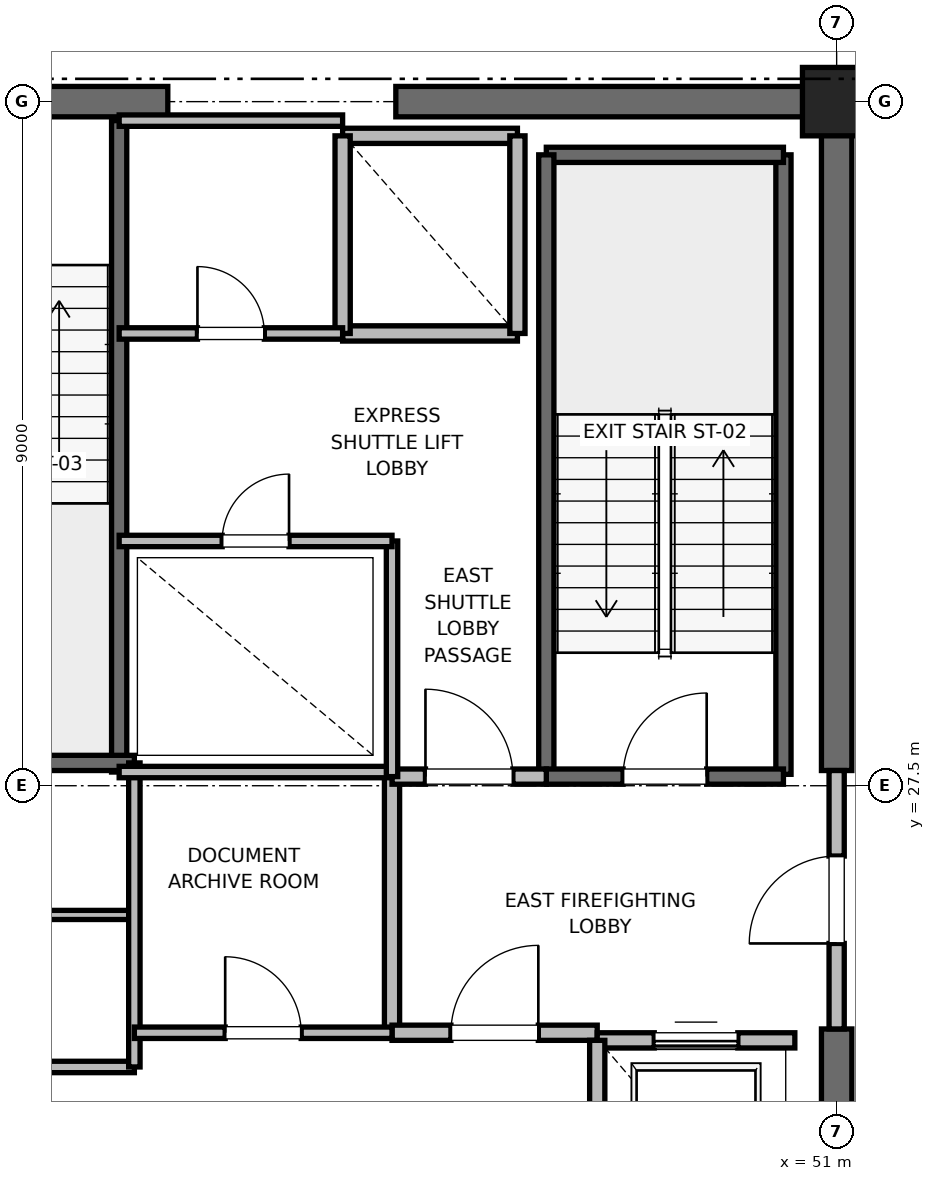
"""IFC4 building model, lengths in metres.
Left out: names, types, materials, properties, quantities, classifications, styles, units other than length and angle.
Written with IfcOpenShell. Run it as: python <this file> out.ifc"""

import sys

from ifc_helpers import new_model, si_unit, direction, frame, frame_2d, origin, origin_2d, place, context, subcontext, project, spatial, rectangle, extrude, element, fill, save


model = new_model("IFC4")
c1 = context("Model", 3, precision=1e-05, world=origin(), true_north=direction((0.0, 1.0)))
c2 = subcontext(c1, "Body", "Model", "MODEL_VIEW")
j1 = project(units=[si_unit("LENGTHUNIT", "METRE"), si_unit("PLANEANGLEUNIT", "RADIAN")], contexts=[c1])
p1 = place(None, origin())
s1 = spatial("IfcSite", under=j1, at=p1, CompositionType="ELEMENT")
p2 = place(p1, origin())
s2 = spatial("IfcBuilding", under=s1, at=p2, CompositionType="ELEMENT")
p3 = place(p2, frame((0.0, 0.0, 310.8)))
s3 = spatial("IfcBuildingStorey", under=s2, at=p3, CompositionType="ELEMENT", Elevation=310.8)
p4 = place(p3, frame((51.0, 36.5, 0.0), z_axis=(0.0, 0.0, 1.0), x_axis=(1.0, 0.0, 0.0)))
e1 = element("IfcColumn", 1, at=p4, inside=s3, PredefinedType="PILASTER", context=c2, shape_type="SweptSolid", body=[
    extrude(rectangle(XDim=0.9, YDim=0.9, at=origin_2d()), origin(), (0.0, 0.0, 1.0), 4.0),
])
p5 = place(p3, frame((37.8, 36.5, 0.0), z_axis=(0.0, 0.0, 1.0), x_axis=(1.0, 0.0, 0.0)))
e2 = element("IfcWall", 2, at=p5, inside=s3, PredefinedType="SHEAR", context=c2, shape_type="SweptSolid", body=[
    extrude(rectangle(XDim=4.4, YDim=0.4, at=frame_2d((2.2, 0.0))), origin(), (0.0, 0.0, 1.0), 3.785),
])
p6 = place(p5, frame((1.65, 0.0, 0.0)))
e3 = element("IfcOpeningElement", 3, at=p6, cuts=e2, PredefinedType="OPENING", context=c2, shape_type="SweptSolid", body=[
    extrude(rectangle(XDim=1.1, YDim=2.15, at=frame_2d((0.55, 1.075))), frame((0.0, 0.2, 0.0), z_axis=(0.0, -1.0, 0.0), x_axis=(1.0, 0.0, 0.0)), (0.0, 0.0, 1.0), 0.4),
])
for number, where, z_axis, x_axis in (
    (4, (45.2, 36.5, 0.0), (0.0, 0.0, 1.0), (1.0, 0.0, 0.0)),
    (5, (51.0, 18.5, 0.0), (0.0, 0.0, 1.0), (0.0, 1.0, 0.0)),
):
    element("IfcWall", number, at=place(p3, frame(where, z_axis=z_axis, x_axis=x_axis)), inside=s3, PredefinedType="SHEAR", context=c2, shape_type="SweptSolid", body=[
        extrude(rectangle(XDim=5.8, YDim=0.4, at=frame_2d((2.9, 0.0))), origin(), (0.0, 0.0, 1.0), 3.785),
    ])
p7 = place(p3, frame((51.0, 27.7, 0.0), z_axis=(0.0, 0.0, 1.0), x_axis=(0.0, 1.0, 0.0)))
e6 = element("IfcWall", 6, at=p7, inside=s3, PredefinedType="SHEAR", context=c2, shape_type="SweptSolid", body=[
    extrude(rectangle(XDim=8.8, YDim=0.4, at=frame_2d((4.4, 0.0))), origin(), (0.0, 0.0, 1.0), 3.785),
])
p8 = place(p3, frame((50.3, 27.65, 0.0), z_axis=(0.0, 0.0, 1.0), x_axis=(0.0, 1.0, 0.0)))
e7 = element("IfcWall", 7, at=p8, inside=s3, PredefinedType="SOLIDWALL", context=c2, shape_type="SweptSolid", body=[
    extrude(rectangle(XDim=8.15, YDim=0.2, at=frame_2d((4.075, 0.0))), origin(), (0.0, 0.0, 1.0), 3.785),
])
p9 = place(p3, frame((47.18, 35.8, 0.0), z_axis=(0.0, 0.0, 1.0), x_axis=(1.0, 0.0, 0.0)))
e8 = element("IfcWall", 8, at=p9, inside=s3, PredefinedType="SOLIDWALL", context=c2, shape_type="SweptSolid", body=[
    extrude(rectangle(XDim=3.12, YDim=0.2, at=frame_2d((1.56, 0.0))), origin(), (0.0, 0.0, 1.0), 3.785),
])
p10 = place(p3, frame((47.18, 27.62, 0.0), z_axis=(0.0, 0.0, 1.0), x_axis=(0.0, 1.0, 0.0)))
e9 = element("IfcWall", 9, at=p10, inside=s3, PredefinedType="SOLIDWALL", context=c2, shape_type="SweptSolid", body=[
    extrude(rectangle(XDim=8.18, YDim=0.2, at=frame_2d((4.09, 0.0))), origin(), (0.0, 0.0, 1.0), 3.785),
])
p11 = place(p3, frame((47.18, 27.62, 0.0), z_axis=(0.0, 0.0, 1.0), x_axis=(1.0, 0.0, 0.0)))
e10 = element("IfcWall", 10, at=p11, inside=s3, PredefinedType="SOLIDWALL", context=c2, shape_type="SweptSolid", body=[
    extrude(rectangle(XDim=3.12, YDim=0.2, at=frame_2d((1.56, 0.0))), origin(), (0.0, 0.0, 1.0), 3.785),
])
p12 = place(p11, frame((1.01, 0.0, 0.0)))
e11 = element("IfcOpeningElement", 11, at=p12, cuts=e10, PredefinedType="OPENING", context=c2, shape_type="SweptSolid", body=[
    extrude(rectangle(XDim=1.1, YDim=2.15, at=frame_2d((0.55, 1.075))), frame((0.0, 0.1, 0.0), z_axis=(0.0, -1.0, 0.0), x_axis=(1.0, 0.0, 0.0)), (0.0, 0.0, 1.0), 0.2),
])
p13 = place(p3, frame((41.56, 27.68, 0.0), z_axis=(0.0, 0.0, 1.0), x_axis=(0.0, 1.0, 0.0)))
e12 = element("IfcWall", 12, at=p13, inside=s3, PredefinedType="SOLIDWALL", context=c2, shape_type="SweptSolid", body=[
    extrude(rectangle(XDim=8.57, YDim=0.2, at=frame_2d((4.285, 0.0))), origin(), (0.0, 0.0, 1.0), 3.785),
])
p14 = place(p3, frame((38.44, 27.8, 0.0), z_axis=(0.0, 0.0, 1.0), x_axis=(1.0, 0.0, 0.0)))
e13 = element("IfcWall", 13, at=p14, inside=s3, PredefinedType="SOLIDWALL", context=c2, shape_type="SweptSolid", body=[
    extrude(rectangle(XDim=3.32, YDim=0.2, at=frame_2d((1.66, 0.0))), origin(), (0.0, 0.0, 1.0), 3.785),
])
p15 = place(p3, frame((45.15, 24.25, 0.0), z_axis=(0.0, 0.0, 1.0), x_axis=(0.0, 1.0, 0.0)))
e14 = element("IfcWall", 14, at=p15, inside=s3, PredefinedType="PARTITIONING", context=c2, shape_type="SweptSolid", body=[
    extrude(rectangle(XDim=3.37, YDim=0.2, at=frame_2d((1.685, 0.0))), origin(), (0.0, 0.0, 1.0), 3.785),
])
p16 = place(p3, frame((45.15, 24.25, 0.0), z_axis=(0.0, 0.0, 1.0), x_axis=(1.0, 0.0, 0.0)))
e15 = element("IfcWall", 15, at=p16, inside=s3, PredefinedType="PARTITIONING", context=c2, shape_type="SweptSolid", body=[
    extrude(rectangle(XDim=2.7, YDim=0.2, at=frame_2d((1.35, 0.0))), origin(), (0.0, 0.0, 1.0), 3.785),
])
p17 = place(p16, frame((0.775, 0.0, 0.0)))
e16 = element("IfcOpeningElement", 16, at=p17, cuts=e15, PredefinedType="OPENING", context=c2, shape_type="SweptSolid", body=[
    extrude(rectangle(XDim=1.15, YDim=2.2, at=frame_2d((0.575, 1.1))), frame((0.0, 0.1, 0.0), z_axis=(0.0, -1.0, 0.0), x_axis=(1.0, 0.0, 0.0)), (0.0, 0.0, 1.0), 0.2),
])
p18 = place(p3, frame((45.15, 27.62, 0.0), z_axis=(0.0, 0.0, 1.0), x_axis=(1.0, 0.0, 0.0)))
e17 = element("IfcWall", 17, at=p18, inside=s3, PredefinedType="PARTITIONING", context=c2, shape_type="SweptSolid", body=[
    extrude(rectangle(XDim=2.03, YDim=0.2, at=frame_2d((1.015, 0.0))), origin(), (0.0, 0.0, 1.0), 3.785),
])
p19 = place(p18, frame((0.44, 0.0, 0.0)))
e18 = element("IfcOpeningElement", 18, at=p19, cuts=e17, PredefinedType="OPENING", context=c2, shape_type="SweptSolid", body=[
    extrude(rectangle(XDim=1.15, YDim=2.2, at=frame_2d((0.575, 1.1))), frame((0.0, 0.1, 0.0), z_axis=(0.0, -1.0, 0.0), x_axis=(1.0, 0.0, 0.0)), (0.0, 0.0, 1.0), 0.2),
])
p20 = place(p3, frame((51.0, 24.3, 0.0), z_axis=(0.0, 0.0, 1.0), x_axis=(0.0, 1.0, 0.0)))
e19 = element("IfcWall", 19, at=p20, inside=s3, PredefinedType="PARTITIONING", context=c2, shape_type="SweptSolid", body=[
    extrude(rectangle(XDim=3.4, YDim=0.2, at=frame_2d((1.7, 0.0))), origin(), (0.0, 0.0, 1.0), 2.865),
])
p21 = place(p20, frame((1.125, 0.0, 0.0)))
e20 = element("IfcOpeningElement", 20, at=p21, cuts=e19, PredefinedType="OPENING", context=c2, shape_type="SweptSolid", body=[
    extrude(rectangle(XDim=1.15, YDim=2.2, at=frame_2d((0.575, 1.1))), frame((0.0, 0.1, 0.0), z_axis=(0.0, -1.0, 0.0), x_axis=(1.0, 0.0, 0.0)), (0.0, 0.0, 1.0), 0.2),
])
p22 = place(p3, frame((50.45, 24.15, 0.0), z_axis=(0.0, 0.0, 1.0), x_axis=(-1.0, 0.0, 0.0)))
e21 = element("IfcWall", 21, at=p22, inside=s3, PredefinedType="SOLIDWALL", context=c2, shape_type="SweptSolid", body=[
    extrude(rectangle(XDim=2.6, YDim=0.2, at=frame_2d((1.3, 0.0))), origin(), (0.0, 0.0, 1.0), 2.865),
])
p23 = place(p22, frame((0.75, 0.0, 0.0)))
e22 = element("IfcOpeningElement", 22, at=p23, cuts=e21, PredefinedType="OPENING", context=c2, shape_type="SweptSolid", body=[
    extrude(rectangle(XDim=1.1, YDim=2.2, at=frame_2d((0.55, 1.1))), frame((0.0, 0.1, 0.0), z_axis=(0.0, -1.0, 0.0), x_axis=(1.0, 0.0, 0.0)), (0.0, 0.0, 1.0), 0.2),
])
p24 = place(p3, frame((47.85, 24.15, 0.0), z_axis=(0.0, 0.0, 1.0), x_axis=(0.0, -1.0, 0.0)))
e23 = element("IfcWall", 23, at=p24, inside=s3, PredefinedType="SOLIDWALL", context=c2, shape_type="SweptSolid", body=[
    extrude(rectangle(XDim=3.0, YDim=0.2, at=frame_2d((1.5, 0.0))), origin(), (0.0, 0.0, 1.0), 3.785),
])
p25 = place(p3, frame((44.5, 33.45, 0.0), z_axis=(0.0, 0.0, 1.0), x_axis=(1.0, 0.0, 0.0)))
e24 = element("IfcWall", 24, at=p25, inside=s3, PredefinedType="SOLIDWALL", context=c2, shape_type="SweptSolid", body=[
    extrude(rectangle(XDim=2.3, YDim=0.2, at=frame_2d((1.15, 0.0))), origin(), (0.0, 0.0, 1.0), 3.785),
])
p26 = place(p3, frame((46.8, 36.05, 0.0), z_axis=(0.0, 0.0, 1.0), x_axis=(-1.0, 0.0, 0.0)))
e25 = element("IfcWall", 25, at=p26, inside=s3, PredefinedType="SOLIDWALL", context=c2, shape_type="SweptSolid", body=[
    extrude(rectangle(XDim=2.3, YDim=0.2, at=frame_2d((1.15, 0.0))), origin(), (0.0, 0.0, 1.0), 2.865),
])
p27 = place(p3, frame((44.5, 36.05, 0.0), z_axis=(0.0, 0.0, 1.0), x_axis=(0.0, -1.0, 0.0)))
e26 = element("IfcWall", 26, at=p27, inside=s3, PredefinedType="SOLIDWALL", context=c2, shape_type="SweptSolid", body=[
    extrude(rectangle(XDim=2.6, YDim=0.2, at=frame_2d((1.3, 0.0))), origin(), (0.0, 0.0, 1.0), 2.865),
])
p28 = place(p3, frame((46.8, 33.45, 0.0), z_axis=(0.0, 0.0, 1.0), x_axis=(0.0, 1.0, 0.0)))
e27 = element("IfcWall", 27, at=p28, inside=s3, PredefinedType="SOLIDWALL", context=c2, shape_type="SweptSolid", body=[
    extrude(rectangle(XDim=2.6, YDim=0.2, at=frame_2d((1.3, 0.0))), origin(), (0.0, 0.0, 1.0), 3.785),
])
p29 = place(p3, frame((39.95, 23.8, 0.0), z_axis=(0.0, 0.0, 1.0), x_axis=(1.0, 0.0, 0.0)))
e28 = element("IfcWall", 28, at=p29, inside=s3, PredefinedType="PARTITIONING", context=c2, shape_type="SweptSolid", body=[
    extrude(rectangle(XDim=1.81, YDim=0.15, at=frame_2d((0.905, 0.0))), origin(), (0.0, 0.0, 1.0), 2.85),
])
p30 = place(p3, frame((39.95, 25.8, 0.0), z_axis=(0.0, 0.0, 1.0), x_axis=(1.0, 0.0, 0.0)))
e29 = element("IfcWall", 29, at=p30, inside=s3, PredefinedType="PARTITIONING", context=c2, shape_type="SweptSolid", body=[
    extrude(rectangle(XDim=1.81, YDim=0.12, at=frame_2d((0.905, 0.0))), origin(), (0.0, 0.0, 1.0), 2.85),
])
p31 = place(p3, frame((41.76, 23.8, 0.0), z_axis=(0.0, 0.0, 1.0), x_axis=(0.0, 1.0, 0.0)))
e30 = element("IfcWall", 30, at=p31, inside=s3, PredefinedType="PARTITIONING", context=c2, shape_type="SweptSolid", body=[
    extrude(rectangle(XDim=4.0, YDim=0.15, at=frame_2d((2.0, 0.0))), origin(), (0.0, 0.0, 1.0), 2.85),
])
p32 = place(p3, frame((41.56, 27.68, 0.0), z_axis=(0.0, 0.0, 1.0), x_axis=(1.0, 0.0, 0.0)))
e31 = element("IfcWall", 31, at=p32, inside=s3, PredefinedType="PARTITIONING", context=c2, shape_type="SweptSolid", body=[
    extrude(rectangle(XDim=3.59, YDim=0.15, at=frame_2d((1.795, 0.0))), origin(), (0.0, 0.0, 1.0), 2.85),
])
p33 = place(p3, frame((41.76, 24.25, 0.0), z_axis=(0.0, 0.0, 1.0), x_axis=(1.0, 0.0, 0.0)))
e32 = element("IfcWall", 32, at=p33, inside=s3, PredefinedType="PARTITIONING", context=c2, shape_type="SweptSolid", body=[
    extrude(rectangle(XDim=3.39, YDim=0.15, at=frame_2d((1.695, 0.0))), origin(), (0.0, 0.0, 1.0), 2.85),
])
p34 = place(p33, frame((1.195, 0.0, 0.0)))
e33 = element("IfcOpeningElement", 33, at=p34, cuts=e32, PredefinedType="OPENING", context=c2, shape_type="SweptSolid", body=[
    extrude(rectangle(XDim=1.0, YDim=2.15, at=frame_2d((0.5, 1.075))), frame((0.0, 0.075, 0.0), z_axis=(0.0, -1.0, 0.0), x_axis=(1.0, 0.0, 0.0)), (0.0, 0.0, 1.0), 0.15),
])
p35 = place(p3, frame((45.15, 27.62, 0.0), z_axis=(0.0, 0.0, 1.0), x_axis=(0.0, 1.0, 0.0)))
e34 = element("IfcWall", 34, at=p35, inside=s3, PredefinedType="PARTITIONING", context=c2, shape_type="SweptSolid", body=[
    extrude(rectangle(XDim=3.1, YDim=0.15, at=frame_2d((1.55, 0.0))), origin(), (0.0, 0.0, 1.0), 2.85),
])
p36 = place(p3, frame((41.56, 30.72, 0.0), z_axis=(0.0, 0.0, 1.0), x_axis=(1.0, 0.0, 0.0)))
e35 = element("IfcWall", 35, at=p36, inside=s3, PredefinedType="PARTITIONING", context=c2, shape_type="SweptSolid", body=[
    extrude(rectangle(XDim=3.59, YDim=0.15, at=frame_2d((1.795, 0.0))), origin(), (0.0, 0.0, 1.0), 2.85),
])
p37 = place(p36, frame((1.355, 0.0, 0.0)))
e36 = element("IfcOpeningElement", 36, at=p37, cuts=e35, PredefinedType="OPENING", context=c2, shape_type="SweptSolid", body=[
    extrude(rectangle(XDim=0.88, YDim=2.1, at=frame_2d((0.44, 1.05))), frame((0.0, 0.075, 0.0), z_axis=(0.0, -1.0, 0.0), x_axis=(1.0, 0.0, 0.0)), (0.0, 0.0, 1.0), 0.15),
])
p38 = place(p3, frame((41.56, 36.25, 0.0), z_axis=(0.0, 0.0, 1.0), x_axis=(1.0, 0.0, 0.0)))
e37 = element("IfcWall", 37, at=p38, inside=s3, PredefinedType="PARTITIONING", context=c2, shape_type="SweptSolid", body=[
    extrude(rectangle(XDim=2.94, YDim=0.15, at=frame_2d((1.47, 0.0))), origin(), (0.0, 0.0, 1.0), 2.85),
])
p39 = place(p3, frame((41.56, 33.45, 0.0), z_axis=(0.0, 0.0, 1.0), x_axis=(1.0, 0.0, 0.0)))
e38 = element("IfcWall", 38, at=p39, inside=s3, PredefinedType="PARTITIONING", context=c2, shape_type="SweptSolid", body=[
    extrude(rectangle(XDim=2.94, YDim=0.15, at=frame_2d((1.47, 0.0))), origin(), (0.0, 0.0, 1.0), 2.85),
])
p40 = place(p39, frame((1.03, 0.0, 0.0)))
e39 = element("IfcOpeningElement", 39, at=p40, cuts=e38, PredefinedType="OPENING", context=c2, shape_type="SweptSolid", body=[
    extrude(rectangle(XDim=0.88, YDim=2.1, at=frame_2d((0.44, 1.05))), frame((0.0, 0.075, 0.0), z_axis=(0.0, -1.0, 0.0), x_axis=(1.0, 0.0, 0.0)), (0.0, 0.0, 1.0), 0.15),
])
p41 = place(p12, origin())
e40 = element("IfcDoor", 40, at=p41, inside=s3, OperationType="SINGLE_SWING_RIGHT", PredefinedType="DOOR", context=c2, shape_type="SweptSolid", body=[
    extrude(rectangle(XDim=1.1, YDim=2.15, at=frame_2d((0.55, 1.075))), frame((0.0, 0.025, 0.0), z_axis=(0.0, -1.0, 0.0), x_axis=(1.0, 0.0, 0.0)), (0.0, 0.0, 1.0), 0.05),
])
fill(e11, e40)
p42 = place(p17, origin())
e41 = element("IfcDoor", 41, at=p42, inside=s3, OperationType="SINGLE_SWING_RIGHT", PredefinedType="DOOR", context=c2, shape_type="SweptSolid", body=[
    extrude(rectangle(XDim=1.15, YDim=2.2, at=frame_2d((0.575, 1.1))), frame((0.0, 0.025, 0.0), z_axis=(0.0, -1.0, 0.0), x_axis=(1.0, 0.0, 0.0)), (0.0, 0.0, 1.0), 0.05),
])
fill(e16, e41)
p43 = place(p19, origin())
e42 = element("IfcDoor", 42, at=p43, inside=s3, OperationType="SINGLE_SWING_LEFT", PredefinedType="DOOR", context=c2, shape_type="SweptSolid", body=[
    extrude(rectangle(XDim=1.15, YDim=2.2, at=frame_2d((0.575, 1.1))), frame((0.0, 0.025, 0.0), z_axis=(0.0, -1.0, 0.0), x_axis=(1.0, 0.0, 0.0)), (0.0, 0.0, 1.0), 0.05),
])
fill(e18, e42)
p44 = place(p21, origin())
e43 = element("IfcDoor", 43, at=p44, inside=s3, OperationType="SINGLE_SWING_LEFT", PredefinedType="DOOR", context=c2, shape_type="SweptSolid", body=[
    extrude(rectangle(XDim=1.15, YDim=2.2, at=frame_2d((0.575, 1.1))), frame((0.0, 0.025, 0.0), z_axis=(0.0, -1.0, 0.0), x_axis=(1.0, 0.0, 0.0)), (0.0, 0.0, 1.0), 0.05),
])
fill(e20, e43)
p45 = place(p23, origin())
e44 = element("IfcDoor", 44, at=p45, inside=s3, OperationType="SLIDING_TO_RIGHT", PredefinedType="DOOR", context=c2, shape_type="SweptSolid", body=[
    extrude(rectangle(XDim=1.1, YDim=2.2, at=frame_2d((0.55, 1.1))), frame((0.0, 0.025, 0.0), z_axis=(0.0, -1.0, 0.0), x_axis=(1.0, 0.0, 0.0)), (0.0, 0.0, 1.0), 0.05),
])
fill(e22, e44)
p46 = place(p34, origin())
e45 = element("IfcDoor", 45, at=p46, inside=s3, OperationType="SINGLE_SWING_LEFT", PredefinedType="DOOR", context=c2, shape_type="SweptSolid", body=[
    extrude(rectangle(XDim=1.0, YDim=2.15, at=frame_2d((0.5, 1.075))), frame((0.0, 0.025, 0.0), z_axis=(0.0, -1.0, 0.0), x_axis=(1.0, 0.0, 0.0)), (0.0, 0.0, 1.0), 0.05),
])
fill(e33, e45)
p47 = place(p37, origin())
e46 = element("IfcDoor", 46, at=p47, inside=s3, OperationType="SINGLE_SWING_RIGHT", PredefinedType="DOOR", context=c2, shape_type="SweptSolid", body=[
    extrude(rectangle(XDim=0.88, YDim=2.1, at=frame_2d((0.44, 1.05))), frame((0.0, 0.025, 0.0), z_axis=(0.0, -1.0, 0.0), x_axis=(1.0, 0.0, 0.0)), (0.0, 0.0, 1.0), 0.05),
])
fill(e36, e46)
p48 = place(p40, origin())
e47 = element("IfcDoor", 47, at=p48, inside=s3, OperationType="SINGLE_SWING_LEFT", PredefinedType="DOOR", context=c2, shape_type="SweptSolid", body=[
    extrude(rectangle(XDim=0.88, YDim=2.1, at=frame_2d((0.44, 1.05))), frame((0.0, 0.025, 0.0), z_axis=(0.0, -1.0, 0.0), x_axis=(1.0, 0.0, 0.0)), (0.0, 0.0, 1.0), 0.05),
])
fill(e39, e47)
save(model, sys.argv[1])
